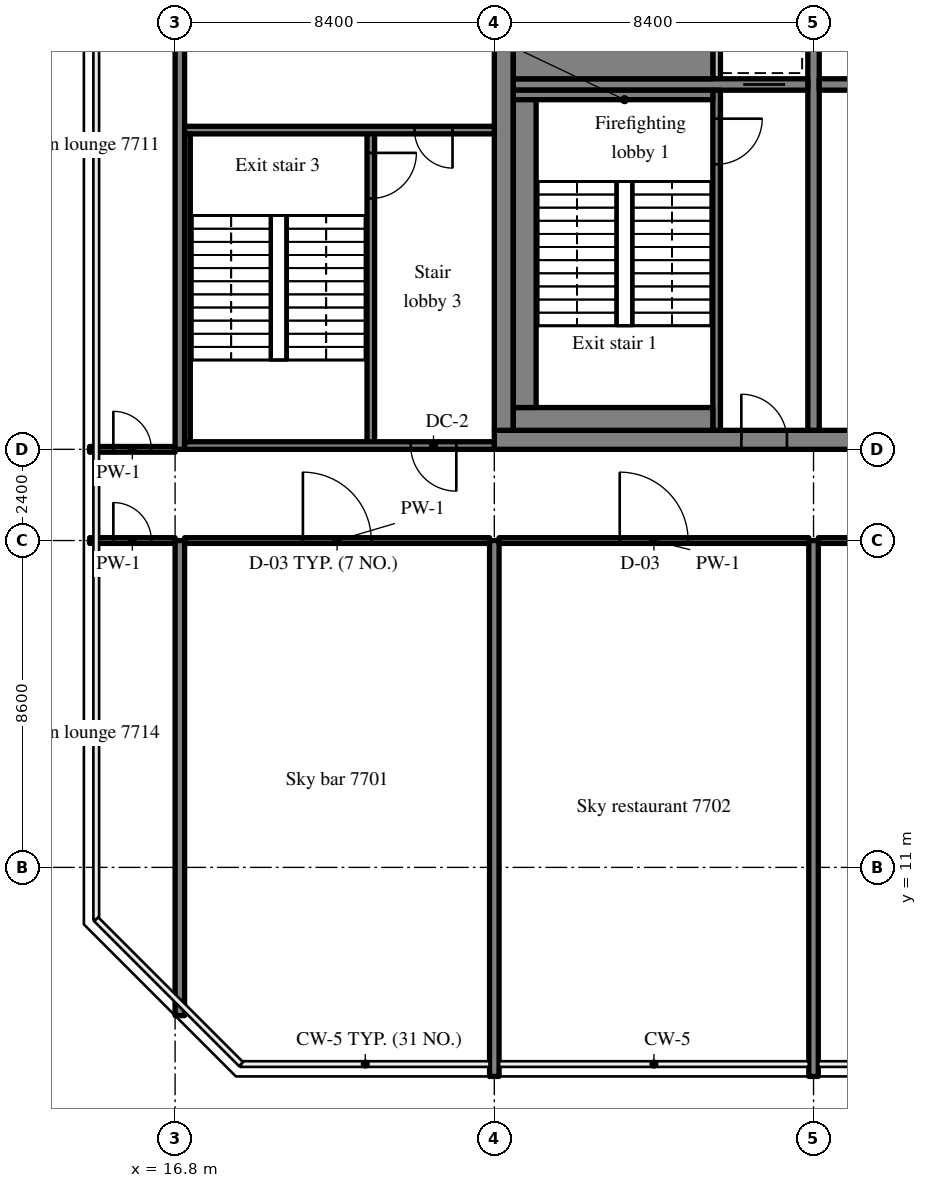
"""IFC4 building model, lengths in metres.
Left out: names, types, materials, properties, quantities, classifications, styles, units other than length and angle.
Written with IfcOpenShell. Run it as: python <this file> out.ifc"""

import sys

from ifc_helpers import new_model, si_unit, direction, frame, frame_2d, origin, place, context, subcontext, project, spatial, rectangle, extrude, source, transform, mapped, element, fill, save


model = new_model("IFC4")
c1 = context("Model", 3, precision=1e-05, world=origin(), true_north=direction((0.0, 1.0)))
c2 = subcontext(c1, "Body", "Model", "MODEL_VIEW")
j1 = project(units=[si_unit("LENGTHUNIT", "METRE"), si_unit("PLANEANGLEUNIT", "RADIAN")], contexts=[c1])
p1 = place(None, origin())
s1 = spatial("IfcSite", under=j1, at=p1, CompositionType="ELEMENT")
p2 = place(p1, origin())
s2 = spatial("IfcBuilding", under=s1, at=p2, CompositionType="ELEMENT")
p3 = place(p2, frame((0.0, 0.0, 323.7)))
s3 = spatial("IfcBuildingStorey", under=s2, at=p3, CompositionType="ELEMENT", Elevation=323.7)
m1 = source(origin(), c2, "Body", "SweptSolid", [
    extrude(rectangle(XDim=50.4, YDim=0.5, at=frame_2d((25.2, 0.0))), origin(), (0.0, 0.0, 1.0), 5.72),
])
p4 = place(p3, frame((25.2, 22.25, 0.0), z_axis=(0.0, 0.0, 1.0), x_axis=(1.0, 0.0, 0.0)))
e1 = element("IfcWall", 1, at=p4, inside=s3, PredefinedType="SHEAR", context=c2, shape_type="MappedRepresentation", body=[
    mapped(m1, transform((0.0, 0.0, 0.0), scale=1.0)),
])
m2 = source(origin(), c2, "Body", "SweptSolid", [
    extrude(rectangle(XDim=1.8, YDim=2.1, at=frame_2d((0.9, 1.05))), frame((0.0, 0.26, 0.0), z_axis=(0.0, -1.0, 0.0), x_axis=(1.0, 0.0, 0.0)), (0.0, 0.0, 1.0), 0.52),
])
p5 = place(p4, frame((15.9, 0.0, 0.0)))
e2 = element("IfcOpeningElement", 2, at=p5, cuts=e1, PredefinedType="OPENING", context=c2, shape_type="MappedRepresentation", body=[
    mapped(m2, transform((0.0, 0.0, 0.0), scale=1.0)),
])
m3 = source(origin(), c2, "Body", "SweptSolid", [
    extrude(rectangle(XDim=0.9, YDim=2.1, at=frame_2d((0.45, 1.05))), frame((0.0, 0.26, 0.0), z_axis=(0.0, -1.0, 0.0), x_axis=(1.0, 0.0, 0.0)), (0.0, 0.0, 1.0), 0.52),
])
p6 = place(p4, frame((9.675, 0.0, 0.0)))
e3 = element("IfcOpeningElement", 3, at=p6, cuts=e1, PredefinedType="OPENING", context=c2, shape_type="MappedRepresentation", body=[
    mapped(m3, transform((0.0, 0.0, 0.0), scale=1.0)),
])
p7 = place(p4, frame((21.525, 0.0, 0.0)))
e4 = element("IfcOpeningElement", 4, at=p7, cuts=e1, PredefinedType="OPENING", context=c2, shape_type="MappedRepresentation", body=[
    mapped(m3, transform((0.0, 0.0, 0.0), scale=1.0)),
])
p8 = place(p4, frame((32.7, 0.0, 0.0)))
e5 = element("IfcOpeningElement", 5, at=p8, cuts=e1, PredefinedType="OPENING", context=c2, shape_type="MappedRepresentation", body=[
    mapped(m2, transform((0.0, 0.0, 0.0), scale=1.0)),
])
m4 = source(origin(), c2, "Body", "SweptSolid", [
    extrude(rectangle(XDim=1.2, YDim=2.1, at=frame_2d((0.6, 1.05))), frame((0.0, 0.26, 0.0), z_axis=(0.0, -1.0, 0.0), x_axis=(1.0, 0.0, 0.0)), (0.0, 0.0, 1.0), 0.52),
])
p9 = place(p4, frame((6.5, 0.0, 0.0)))
e6 = element("IfcOpeningElement", 6, at=p9, cuts=e1, PredefinedType="OPENING", context=c2, shape_type="MappedRepresentation", body=[
    mapped(m4, transform((0.0, 0.0, 0.0), scale=1.0)),
])
p10 = place(p4, frame((47.975, 0.0, 0.0)))
e7 = element("IfcOpeningElement", 7, at=p10, cuts=e1, PredefinedType="OPENING", context=c2, shape_type="MappedRepresentation", body=[
    mapped(m4, transform((0.0, 0.0, 0.0), scale=1.0)),
])
m5 = source(origin(), c2, "Body", "SweptSolid", [
    extrude(rectangle(XDim=19.0, YDim=0.5, at=frame_2d((9.5, 0.0))), origin(), (0.0, 0.0, 1.0), 5.72),
])
p11 = place(p3, frame((25.45, 22.5, 0.0), z_axis=(0.0, 0.0, 1.0), x_axis=(0.0, 1.0, 0.0)))
e8 = element("IfcWall", 8, at=p11, inside=s3, PredefinedType="SHEAR", context=c2, shape_type="MappedRepresentation", body=[
    mapped(m5, transform((0.0, 0.0, 0.0), scale=1.0)),
])
m6 = source(origin(), c2, "Body", "SweptSolid", [
    extrude(rectangle(XDim=19.0, YDim=0.3, at=frame_2d((9.5, 0.0))), origin(), (0.0, 0.0, 1.0), 5.72),
])
p12 = place(p3, frame((33.6, 22.5, 0.0), z_axis=(0.0, 0.0, 1.0), x_axis=(0.0, 1.0, 0.0)))
e9 = element("IfcWall", 9, at=p12, inside=s3, PredefinedType="SHEAR", context=c2, shape_type="MappedRepresentation", body=[
    mapped(m6, transform((0.0, 0.0, 0.0), scale=1.0)),
])
m7 = source(origin(), c2, "Body", "SweptSolid", [
    extrude(rectangle(XDim=1.1, YDim=2.1, at=frame_2d((0.55, 1.05))), frame((0.0, 0.16, 0.0), z_axis=(0.0, -1.0, 0.0), x_axis=(1.0, 0.0, 0.0)), (0.0, 0.0, 1.0), 0.32),
])
p13 = place(p12, frame((12.95, 0.0, 0.0)))
e10 = element("IfcOpeningElement", 10, at=p13, cuts=e9, PredefinedType="OPENING", context=c2, shape_type="MappedRepresentation", body=[
    mapped(m7, transform((0.0, 0.0, 0.0), scale=1.0)),
])
m8 = source(origin(), c2, "Body", "SweptSolid", [
    extrude(rectangle(XDim=7.75, YDim=0.3, at=frame_2d((3.875, 0.0))), origin(), (0.0, 0.0, 1.0), 5.72),
])
p14 = place(p3, frame((25.7, 31.6, 0.0), z_axis=(0.0, 0.0, 1.0), x_axis=(1.0, 0.0, 0.0)))
e11 = element("IfcWall", 11, at=p14, inside=s3, PredefinedType="SHEAR", context=c2, shape_type="MappedRepresentation", body=[
    mapped(m8, transform((0.0, 0.0, 0.0), scale=1.0)),
])
p15 = place(p14, frame((6.05, 0.0, 0.0)))
e12 = element("IfcOpeningElement", 12, at=p15, cuts=e11, PredefinedType="OPENING", context=c2, shape_type="MappedRepresentation", body=[
    mapped(m7, transform((0.0, 0.0, 0.0), scale=1.0)),
])
m9 = source(origin(), c2, "Body", "SweptSolid", [
    extrude(rectangle(XDim=16.5, YDim=0.3, at=frame_2d((8.25, 0.0))), origin(), (0.0, 0.0, 1.0), 5.72),
])
p16 = place(p3, frame((33.75, 31.6, 0.0), z_axis=(0.0, 0.0, 1.0), x_axis=(1.0, 0.0, 0.0)))
e13 = element("IfcWall", 13, at=p16, inside=s3, PredefinedType="SHEAR", context=c2, shape_type="MappedRepresentation", body=[
    mapped(m9, transform((0.0, 0.0, 0.0), scale=1.0)),
])
m10 = source(origin(), c2, "Body", "SweptSolid", [
    extrude(rectangle(XDim=1.0, YDim=2.1, at=frame_2d((0.5, 1.05))), frame((0.0, 0.16, 0.0), z_axis=(0.0, -1.0, 0.0), x_axis=(1.0, 0.0, 0.0)), (0.0, 0.0, 1.0), 0.32),
])
p17 = place(p16, frame((14.875, 0.0, 0.0)))
e14 = element("IfcOpeningElement", 14, at=p17, cuts=e13, PredefinedType="OPENING", context=c2, shape_type="MappedRepresentation", body=[
    mapped(m10, transform((0.0, 0.0, 0.0), scale=1.0)),
])
m11 = source(origin(), c2, "Body", "SweptSolid", [
    extrude(rectangle(XDim=12.5, YDim=0.25, at=frame_2d((6.25, 0.0))), origin(), (0.0, 0.0, 1.0), 5.72),
])
p18 = place(p3, frame((16.925, 7.1, 0.0), z_axis=(0.0, 0.0, 1.0), x_axis=(0.0, 1.0, 0.0)))
e15 = element("IfcWall", 15, at=p18, inside=s3, PredefinedType="SHEAR", context=c2, shape_type="MappedRepresentation", body=[
    mapped(m11, transform((0.0, 0.0, 0.0), scale=1.0)),
])
m12 = source(origin(), c2, "Body", "SweptSolid", [
    extrude(rectangle(XDim=18.4, YDim=0.25, at=frame_2d((9.2, 0.0))), origin(), (0.0, 0.0, 1.0), 5.72),
])
p19 = place(p3, frame((16.925, 22.0, 0.0), z_axis=(0.0, 0.0, 1.0), x_axis=(0.0, 1.0, 0.0)))
e16 = element("IfcWall", 16, at=p19, inside=s3, PredefinedType="SHEAR", context=c2, shape_type="MappedRepresentation", body=[
    mapped(m12, transform((0.0, 0.0, 0.0), scale=1.0)),
])
m13 = source(origin(), c2, "Body", "SweptSolid", [
    extrude(rectangle(XDim=14.1, YDim=0.25, at=frame_2d((7.05, 0.0))), origin(), (0.0, 0.0, 1.0), 5.72),
])
for number, where, z_axis, x_axis in (
    (17, (25.2, 5.5, 0.0), (0.0, 0.0, 1.0), (0.0, 1.0, 0.0)),
    (18, (33.6, 5.5, 0.0), (0.0, 0.0, 1.0), (0.0, 1.0, 0.0)),
):
    element("IfcWall", number, at=place(p3, frame(where, z_axis=z_axis, x_axis=x_axis)), inside=s3, PredefinedType="SHEAR", context=c2, shape_type="MappedRepresentation", body=[
        mapped(m13, transform((0.0, 0.0, 0.0), scale=1.0)),
    ])
m14 = source(origin(), c2, "Body", "SweptSolid", [
    extrude(rectangle(XDim=8.95, YDim=0.2, at=frame_2d((4.475, 0.0))), origin(), (0.0, 0.0, 1.0), 5.72),
])
p20 = place(p3, frame((31.05, 22.5, 0.0), z_axis=(0.0, 0.0, 1.0), x_axis=(0.0, 1.0, 0.0)))
e19 = element("IfcWall", 19, at=p20, inside=s3, PredefinedType="SOLIDWALL", context=c2, shape_type="MappedRepresentation", body=[
    mapped(m14, transform((0.0, 0.0, 0.0), scale=1.0)),
])
m15 = source(origin(), c2, "Body", "SweptSolid", [
    extrude(rectangle(XDim=1.2, YDim=2.1, at=frame_2d((0.6, 1.05))), frame((0.0, 0.11, 0.0), z_axis=(0.0, -1.0, 0.0), x_axis=(1.0, 0.0, 0.0)), (0.0, 0.0, 1.0), 0.22),
])
p21 = place(p20, frame((7.0, 0.0, 0.0)))
e20 = element("IfcOpeningElement", 20, at=p21, cuts=e19, PredefinedType="OPENING", context=c2, shape_type="MappedRepresentation", body=[
    mapped(m15, transform((0.0, 0.0, 0.0), scale=1.0)),
])
m16 = source(origin(), c2, "Body", "SweptSolid", [
    extrude(rectangle(XDim=1.85, YDim=0.2, at=frame_2d((0.925, 0.0))), origin(), (0.0, 0.0, 1.0), 5.72),
])
p22 = place(p3, frame((31.05, 31.75, 0.0), z_axis=(0.0, 0.0, 1.0), x_axis=(0.0, 1.0, 0.0)))
e21 = element("IfcWall", 21, at=p22, inside=s3, PredefinedType="SOLIDWALL", context=c2, shape_type="MappedRepresentation", body=[
    mapped(m16, transform((0.0, 0.0, 0.0), scale=1.0)),
])
m17 = source(origin(), c2, "Body", "SweptSolid", [
    extrude(rectangle(XDim=8.3, YDim=0.2, at=frame_2d((4.15, 0.0))), origin(), (0.0, 0.0, 1.0), 5.72),
])
p23 = place(p3, frame((21.95, 22.1, 0.0), z_axis=(0.0, 0.0, 1.0), x_axis=(0.0, 1.0, 0.0)))
e22 = element("IfcWall", 22, at=p23, inside=s3, PredefinedType="SOLIDWALL", context=c2, shape_type="MappedRepresentation", body=[
    mapped(m17, transform((0.0, 0.0, 0.0), scale=1.0)),
])
p24 = place(p23, frame((6.5, 0.0, 0.0)))
e23 = element("IfcOpeningElement", 23, at=p24, cuts=e22, PredefinedType="OPENING", context=c2, shape_type="MappedRepresentation", body=[
    mapped(m15, transform((0.0, 0.0, 0.0), scale=1.0)),
])
m18 = source(origin(), c2, "Body", "SweptSolid", [
    extrude(rectangle(XDim=8.15, YDim=0.2, at=frame_2d((4.075, 0.0))), origin(), (0.0, 0.0, 1.0), 5.72),
])
p25 = place(p3, frame((17.05, 22.1, 0.0), z_axis=(0.0, 0.0, 1.0), x_axis=(1.0, 0.0, 0.0)))
e24 = element("IfcWall", 24, at=p25, inside=s3, PredefinedType="SOLIDWALL", context=c2, shape_type="MappedRepresentation", body=[
    mapped(m18, transform((0.0, 0.0, 0.0), scale=1.0)),
])
p26 = place(p25, frame((5.95, 0.0, 0.0)))
e25 = element("IfcOpeningElement", 25, at=p26, cuts=e24, PredefinedType="OPENING", context=c2, shape_type="MappedRepresentation", body=[
    mapped(m15, transform((0.0, 0.0, 0.0), scale=1.0)),
])
p27 = place(p3, frame((17.05, 30.4, 0.0), z_axis=(0.0, 0.0, 1.0), x_axis=(1.0, 0.0, 0.0)))
e26 = element("IfcWall", 26, at=p27, inside=s3, PredefinedType="SOLIDWALL", context=c2, shape_type="MappedRepresentation", body=[
    mapped(m18, transform((0.0, 0.0, 0.0), scale=1.0)),
])
m19 = source(origin(), c2, "Body", "SweptSolid", [
    extrude(rectangle(XDim=1.0, YDim=2.1, at=frame_2d((0.5, 1.05))), frame((0.0, 0.11, 0.0), z_axis=(0.0, -1.0, 0.0), x_axis=(1.0, 0.0, 0.0)), (0.0, 0.0, 1.0), 0.22),
])
p28 = place(p27, frame((6.05, 0.0, 0.0)))
e27 = element("IfcOpeningElement", 27, at=p28, cuts=e26, PredefinedType="OPENING", context=c2, shape_type="MappedRepresentation", body=[
    mapped(m19, transform((0.0, 0.0, 0.0), scale=1.0)),
])
m20 = source(origin(), c2, "Body", "SweptSolid", [
    extrude(rectangle(XDim=5.25, YDim=0.6, at=frame_2d((2.625, 0.0))), origin(), (0.0, 0.0, 1.0), 5.72),
])
p29 = place(p3, frame((25.7, 22.8, 0.0), z_axis=(0.0, 0.0, 1.0), x_axis=(1.0, 0.0, 0.0)))
e28 = element("IfcWall", 28, at=p29, inside=s3, PredefinedType="SOLIDWALL", context=c2, shape_type="MappedRepresentation", body=[
    mapped(m20, transform((0.0, 0.0, 0.0), scale=1.0)),
])
m21 = source(origin(), c2, "Body", "SweptSolid", [
    extrude(rectangle(XDim=5.25, YDim=0.25, at=frame_2d((2.625, 0.0))), origin(), (0.0, 0.0, 1.0), 5.72),
])
p30 = place(p3, frame((25.7, 31.325, 0.0), z_axis=(0.0, 0.0, 1.0), x_axis=(1.0, 0.0, 0.0)))
e29 = element("IfcWall", 29, at=p30, inside=s3, PredefinedType="SOLIDWALL", context=c2, shape_type="MappedRepresentation", body=[
    mapped(m21, transform((0.0, 0.0, 0.0), scale=1.0)),
])
m22 = source(origin(), c2, "Body", "SweptSolid", [
    extrude(rectangle(XDim=8.1, YDim=0.6, at=frame_2d((4.05, 0.0))), origin(), (0.0, 0.0, 1.0), 5.72),
])
p31 = place(p3, frame((26.0, 23.1, 0.0), z_axis=(0.0, 0.0, 1.0), x_axis=(0.0, 1.0, 0.0)))
e30 = element("IfcWall", 30, at=p31, inside=s3, PredefinedType="SOLIDWALL", context=c2, shape_type="MappedRepresentation", body=[
    mapped(m22, transform((0.0, 0.0, 0.0), scale=1.0)),
])
m23 = source(origin(), c2, "Body", "SweptSolid", [
    extrude(rectangle(XDim=8.1, YDim=0.15, at=frame_2d((4.05, 0.0))), origin(), (0.0, 0.0, 1.0), 5.72),
])
p32 = place(p3, frame((17.125, 22.2, 0.0), z_axis=(0.0, 0.0, 1.0), x_axis=(0.0, 1.0, 0.0)))
e31 = element("IfcWall", 31, at=p32, inside=s3, PredefinedType="SOLIDWALL", context=c2, shape_type="MappedRepresentation", body=[
    mapped(m23, transform((0.0, 0.0, 0.0), scale=1.0)),
])
m24 = source(origin(), c2, "Body", "SweptSolid", [
    extrude(rectangle(XDim=5.25, YDim=1.05, at=frame_2d((2.625, 0.0))), origin(), (0.0, 0.0, 1.0), 5.72),
])
p33 = place(p3, frame((25.7, 32.275, 0.0), z_axis=(0.0, 0.0, 1.0), x_axis=(1.0, 0.0, 0.0)))
e32 = element("IfcWall", 32, at=p33, inside=s3, PredefinedType="SOLIDWALL", context=c2, shape_type="MappedRepresentation", body=[
    mapped(m24, transform((0.0, 0.0, 0.0), scale=1.0)),
])
m25 = source(origin(), c2, "Body", "SweptSolid", [
    extrude(rectangle(XDim=8.025, YDim=0.15, at=frame_2d((4.012, 0.0))), origin(), (0.0, 0.0, 1.0), 5.02),
])
p34 = place(p3, frame((17.05, 19.6, 0.0), z_axis=(0.0, 0.0, 1.0), x_axis=(1.0, 0.0, 0.0)))
e33 = element("IfcWall", 33, at=p34, inside=s3, PredefinedType="PARTITIONING", context=c2, shape_type="MappedRepresentation", body=[
    mapped(m25, transform((0.0, 0.0, 0.0), scale=1.0)),
])
m26 = source(origin(), c2, "Body", "SweptSolid", [
    extrude(rectangle(XDim=1.8, YDim=2.1, at=frame_2d((0.9, 1.05))), frame((0.0, 0.085, 0.0), z_axis=(0.0, -1.0, 0.0), x_axis=(1.0, 0.0, 0.0)), (0.0, 0.0, 1.0), 0.17),
])
p35 = place(p34, frame((3.113, 0.0, 0.0)))
e34 = element("IfcOpeningElement", 34, at=p35, cuts=e33, PredefinedType="OPENING", context=c2, shape_type="MappedRepresentation", body=[
    mapped(m26, transform((0.0, 0.0, 0.0), scale=1.0)),
])
m27 = source(origin(), c2, "Body", "SweptSolid", [
    extrude(rectangle(XDim=8.15, YDim=0.15, at=frame_2d((4.075, 0.0))), origin(), (0.0, 0.0, 1.0), 5.02),
])
p36 = place(p3, frame((25.325, 19.6, 0.0), z_axis=(0.0, 0.0, 1.0), x_axis=(1.0, 0.0, 0.0)))
e35 = element("IfcWall", 35, at=p36, inside=s3, PredefinedType="PARTITIONING", context=c2, shape_type="MappedRepresentation", body=[
    mapped(m27, transform((0.0, 0.0, 0.0), scale=1.0)),
])
p37 = place(p36, frame((3.175, 0.0, 0.0)))
e36 = element("IfcOpeningElement", 36, at=p37, cuts=e35, PredefinedType="OPENING", context=c2, shape_type="MappedRepresentation", body=[
    mapped(m26, transform((0.0, 0.0, 0.0), scale=1.0)),
])
m28 = source(origin(), c2, "Body", "SweptSolid", [
    extrude(rectangle(XDim=8.15, YDim=0.15, at=frame_2d((4.075, 0.0))), origin(), (0.0, 0.0, 1.0), 5.02),
])
p38 = place(p3, frame((33.725, 19.6, 0.0), z_axis=(0.0, 0.0, 1.0), x_axis=(1.0, 0.0, 0.0)))
e37 = element("IfcWall", 37, at=p38, inside=s3, PredefinedType="PARTITIONING", context=c2, shape_type="MappedRepresentation", body=[
    mapped(m28, transform((0.0, 0.0, 0.0), scale=1.0)),
])
p39 = place(p38, frame((3.175, 0.0, 0.0)))
e38 = element("IfcOpeningElement", 38, at=p39, cuts=e37, PredefinedType="OPENING", context=c2, shape_type="MappedRepresentation", body=[
    mapped(m26, transform((0.0, 0.0, 0.0), scale=1.0)),
])
m29 = source(origin(), c2, "Body", "SweptSolid", [
    extrude(rectangle(XDim=2.25, YDim=0.15, at=frame_2d((1.125, 0.0))), origin(), (0.0, 0.0, 1.0), 5.02),
])
p40 = place(p3, frame((14.55, 22.0, 0.0), z_axis=(0.0, 0.0, 1.0), x_axis=(1.0, 0.0, 0.0)))
e39 = element("IfcWall", 39, at=p40, inside=s3, PredefinedType="PARTITIONING", context=c2, shape_type="MappedRepresentation", body=[
    mapped(m29, transform((0.0, 0.0, 0.0), scale=1.0)),
])
m30 = source(origin(), c2, "Body", "SweptSolid", [
    extrude(rectangle(XDim=1.0, YDim=2.1, at=frame_2d((0.5, 1.05))), frame((0.0, 0.085, 0.0), z_axis=(0.0, -1.0, 0.0), x_axis=(1.0, 0.0, 0.0)), (0.0, 0.0, 1.0), 0.17),
])
p41 = place(p40, frame((0.625, 0.0, 0.0)))
e40 = element("IfcOpeningElement", 40, at=p41, cuts=e39, PredefinedType="OPENING", context=c2, shape_type="MappedRepresentation", body=[
    mapped(m30, transform((0.0, 0.0, 0.0), scale=1.0)),
])
p42 = place(p3, frame((14.55, 19.6, 0.0), z_axis=(0.0, 0.0, 1.0), x_axis=(1.0, 0.0, 0.0)))
e41 = element("IfcWall", 41, at=p42, inside=s3, PredefinedType="PARTITIONING", context=c2, shape_type="MappedRepresentation", body=[
    mapped(m29, transform((0.0, 0.0, 0.0), scale=1.0)),
])
p43 = place(p42, frame((0.625, 0.0, 0.0)))
e42 = element("IfcOpeningElement", 42, at=p43, cuts=e41, PredefinedType="OPENING", context=c2, shape_type="MappedRepresentation", body=[
    mapped(m30, transform((0.0, 0.0, 0.0), scale=1.0)),
])
m31 = source(origin(), c2, "Body", "SweptSolid", [
    extrude(rectangle(XDim=1.2, YDim=2.1, at=frame_2d((0.6, 1.05))), frame((0.0, 0.025, 0.0), z_axis=(0.0, -1.0, 0.0), x_axis=(1.0, 0.0, 0.0)), (0.0, 0.0, 1.0), 0.05),
])
p44 = place(p21, origin())
e43 = element("IfcDoor", 43, at=p44, inside=s3, OperationType="SINGLE_SWING_RIGHT", PredefinedType="DOOR", context=c2, shape_type="MappedRepresentation", body=[
    mapped(m31, transform((0.0, 0.0, 0.0), scale=1.0)),
])
fill(e20, e43)
m32 = source(origin(), c2, "Body", "SweptSolid", [
    extrude(rectangle(XDim=1.2, YDim=2.1, at=frame_2d((0.6, 1.05))), frame((0.0, 0.175, 0.0), z_axis=(0.0, -1.0, 0.0), x_axis=(1.0, 0.0, 0.0)), (0.0, 0.0, 1.0), 0.05),
])
p45 = place(p9, origin())
e44 = element("IfcDoor", 44, at=p45, inside=s3, OperationType="SINGLE_SWING_LEFT", PredefinedType="DOOR", context=c2, shape_type="MappedRepresentation", body=[
    mapped(m32, transform((0.0, 0.0, 0.0), scale=1.0)),
])
fill(e6, e44)
m33 = source(origin(), c2, "Body", "SweptSolid", [
    extrude(rectangle(XDim=1.1, YDim=2.1, at=frame_2d((0.55, 1.05))), frame((0.0, 0.025, 0.0), z_axis=(0.0, -1.0, 0.0), x_axis=(1.0, 0.0, 0.0)), (0.0, 0.0, 1.0), 0.05),
])
p46 = place(p15, origin())
e45 = element("IfcDoor", 45, at=p46, inside=s3, OperationType="SLIDING_TO_LEFT", PredefinedType="DOOR", context=c2, shape_type="MappedRepresentation", body=[
    mapped(m33, transform((0.0, 0.0, 0.0), scale=1.0)),
])
fill(e12, e45)
p47 = place(p24, origin())
e46 = element("IfcDoor", 46, at=p47, inside=s3, OperationType="SINGLE_SWING_RIGHT", PredefinedType="DOOR", context=c2, shape_type="MappedRepresentation", body=[
    mapped(m31, transform((0.0, 0.0, 0.0), scale=1.0)),
])
fill(e23, e46)
p48 = place(p26, origin())
e47 = element("IfcDoor", 47, at=p48, inside=s3, OperationType="SINGLE_SWING_RIGHT", PredefinedType="DOOR", context=c2, shape_type="MappedRepresentation", body=[
    mapped(m31, transform((0.0, 0.0, 0.0), scale=1.0)),
])
fill(e25, e47)
m34 = source(origin(), c2, "Body", "SweptSolid", [
    extrude(rectangle(XDim=1.0, YDim=2.1, at=frame_2d((0.5, 1.05))), frame((0.0, 0.025, 0.0), z_axis=(0.0, -1.0, 0.0), x_axis=(1.0, 0.0, 0.0)), (0.0, 0.0, 1.0), 0.05),
])
p49 = place(p28, origin())
e48 = element("IfcDoor", 48, at=p49, inside=s3, OperationType="SINGLE_SWING_RIGHT", PredefinedType="DOOR", context=c2, shape_type="MappedRepresentation", body=[
    mapped(m34, transform((0.0, 0.0, 0.0), scale=1.0)),
])
fill(e27, e48)
m35 = source(origin(), c2, "Body", "SweptSolid", [
    extrude(rectangle(XDim=1.8, YDim=2.1, at=frame_2d((0.9, 1.05))), frame((0.0, 0.025, 0.0), z_axis=(0.0, -1.0, 0.0), x_axis=(1.0, 0.0, 0.0)), (0.0, 0.0, 1.0), 0.05),
])
p50 = place(p35, origin())
e49 = element("IfcDoor", 49, at=p50, inside=s3, OperationType="DOUBLE_DOOR_SINGLE_SWING", PredefinedType="DOOR", context=c2, shape_type="MappedRepresentation", body=[
    mapped(m35, transform((0.0, 0.0, 0.0), scale=1.0)),
])
fill(e34, e49)
p51 = place(p37, origin())
e50 = element("IfcDoor", 50, at=p51, inside=s3, OperationType="DOUBLE_DOOR_SINGLE_SWING", PredefinedType="DOOR", context=c2, shape_type="MappedRepresentation", body=[
    mapped(m35, transform((0.0, 0.0, 0.0), scale=1.0)),
])
fill(e36, e50)
p52 = place(p41, origin())
e51 = element("IfcDoor", 51, at=p52, inside=s3, OperationType="SINGLE_SWING_LEFT", PredefinedType="DOOR", context=c2, shape_type="MappedRepresentation", body=[
    mapped(m34, transform((0.0, 0.0, 0.0), scale=1.0)),
])
fill(e40, e51)
p53 = place(p43, origin())
e52 = element("IfcDoor", 52, at=p53, inside=s3, OperationType="SINGLE_SWING_LEFT", PredefinedType="DOOR", context=c2, shape_type="MappedRepresentation", body=[
    mapped(m34, transform((0.0, 0.0, 0.0), scale=1.0)),
])
fill(e42, e52)
save(model, sys.argv[1])
